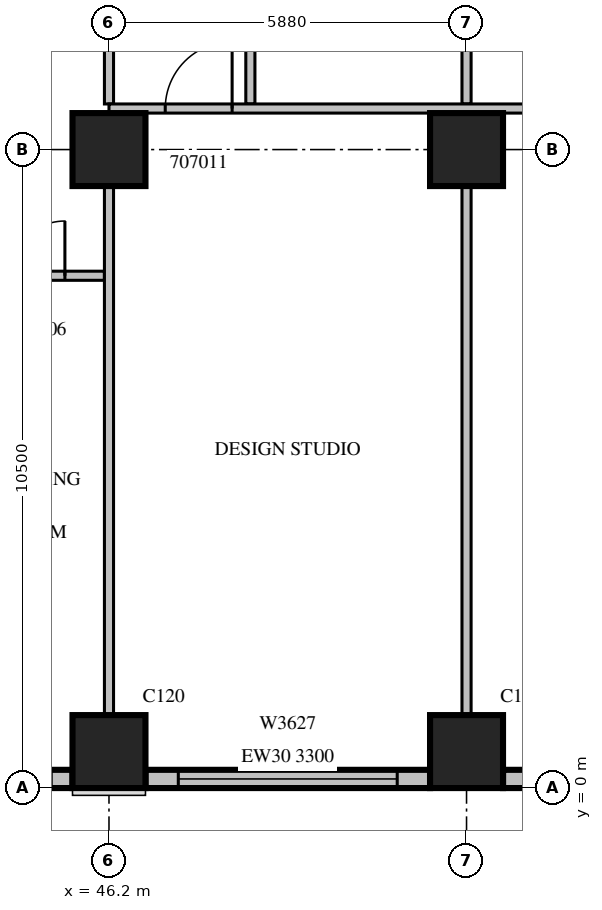
"""IFC4 building model, lengths in metres.
Left out: names, types, materials, properties, quantities, classifications, styles, units other than length and angle.
Written with IfcOpenShell. Run it as: python <this file> out.ifc"""

import sys

from ifc_helpers import new_model, si_unit, direction, frame, frame_2d, origin, origin_2d, place, context, subcontext, project, spatial, rectangle, extrude, source, transform, mapped, element, fill, save


model = new_model("IFC4")
c1 = context("Model", 3, precision=1e-05, world=origin(), true_north=direction((0.0, 1.0)))
c2 = subcontext(c1, "Body", "Model", "MODEL_VIEW")
j1 = project(units=[si_unit("LENGTHUNIT", "METRE"), si_unit("PLANEANGLEUNIT", "RADIAN")], contexts=[c1])
p1 = place(None, origin())
s1 = spatial("IfcSite", under=j1, at=p1, CompositionType="ELEMENT")
p2 = place(p1, origin())
s2 = spatial("IfcBuilding", under=s1, at=p2, CompositionType="ELEMENT")
p3 = place(p2, frame((0.0, 0.0, 40.5)))
s3 = spatial("IfcBuildingStorey", under=s2, at=p3, CompositionType="ELEMENT", Elevation=40.5)
m1 = source(origin(), c2, "Body", "SweptSolid", [
    extrude(rectangle(XDim=1.2, YDim=1.2, at=origin_2d()), origin(), (0.0, 0.0, 1.0), 4.2),
])
for number, where, z_axis, x_axis in (
    (1, (46.2, 0.6, 0.0), (0.0, 0.0, 1.0), (1.0, 0.0, 0.0)),
    (2, (52.08, 0.6, 0.0), (0.0, 0.0, 1.0), (1.0, 0.0, 0.0)),
    (3, (46.2, 10.5, 0.0), (0.0, 0.0, 1.0), (1.0, 0.0, 0.0)),
    (4, (52.08, 10.5, 0.0), (0.0, 0.0, 1.0), (1.0, 0.0, 0.0)),
):
    element("IfcColumn", number, at=place(p3, frame(where, z_axis=z_axis, x_axis=x_axis)), inside=s3, PredefinedType="COLUMN", context=c2, shape_type="MappedRepresentation", body=[
        mapped(m1, transform((0.0, 0.0, 0.0), scale=1.0)),
    ])
p4 = place(p3, frame((44.0, 0.15, 0.0), z_axis=(0.0, 0.0, 1.0), x_axis=(1.0, 0.0, 0.0)))
e5 = element("IfcWall", 5, at=p4, inside=s3, PredefinedType="STANDARD", context=c2, shape_type="SweptSolid", body=[
    extrude(rectangle(XDim=1.6, YDim=0.3, at=frame_2d((0.8, 0.0))), origin(), (0.0, 0.0, 1.0), 3.8),
])
p5 = place(p4, frame((0.35, 0.0, 0.6)))
e6 = element("IfcOpeningElement", 6, at=p5, cuts=e5, PredefinedType="OPENING", context=c2, shape_type="SweptSolid", body=[
    extrude(rectangle(XDim=0.9, YDim=2.7, at=frame_2d((0.45, 1.35))), frame((0.0, 0.16, 0.0), z_axis=(0.0, -1.0, 0.0), x_axis=(1.0, 0.0, 0.0)), (0.0, 0.0, 1.0), 0.32),
])
p6 = place(p3, frame((46.8, 0.15, 0.0), z_axis=(0.0, 0.0, 1.0), x_axis=(1.0, 0.0, 0.0)))
e7 = element("IfcWall", 7, at=p6, inside=s3, PredefinedType="STANDARD", context=c2, shape_type="SweptSolid", body=[
    extrude(rectangle(XDim=4.68, YDim=0.3, at=frame_2d((2.34, 0.0))), origin(), (0.0, 0.0, 1.0), 3.3),
])
m2 = source(origin(), c2, "Body", "SweptSolid", [
    extrude(rectangle(XDim=3.6, YDim=2.7, at=frame_2d((1.8, 1.35))), frame((0.0, 0.16, 0.0), z_axis=(0.0, -1.0, 0.0), x_axis=(1.0, 0.0, 0.0)), (0.0, 0.0, 1.0), 0.32),
])
p7 = place(p6, frame((0.54, 0.0, 0.6)))
e8 = element("IfcOpeningElement", 8, at=p7, cuts=e7, PredefinedType="OPENING", context=c2, shape_type="MappedRepresentation", body=[
    mapped(m2, transform((0.0, 0.0, 0.0), scale=1.0)),
])
p8 = place(p3, frame((52.68, 0.15, 0.0), z_axis=(0.0, 0.0, 1.0), x_axis=(1.0, 0.0, 0.0)))
e9 = element("IfcWall", 9, at=p8, inside=s3, PredefinedType="STANDARD", context=c2, shape_type="SweptSolid", body=[
    extrude(rectangle(XDim=4.68, YDim=0.3, at=frame_2d((2.34, 0.0))), origin(), (0.0, 0.0, 1.0), 3.8),
])
p9 = place(p8, frame((0.54, 0.0, 0.6)))
e10 = element("IfcOpeningElement", 10, at=p9, cuts=e9, PredefinedType="OPENING", context=c2, shape_type="MappedRepresentation", body=[
    mapped(m2, transform((0.0, 0.0, 0.0), scale=1.0)),
])
p10 = place(p3, frame((46.125, 8.425, 0.0), z_axis=(0.0, 0.0, 1.0), x_axis=(-1.0, 0.0, 0.0)))
e11 = element("IfcWall", 11, at=p10, inside=s3, PredefinedType="PARTITIONING", context=c2, shape_type="SweptSolid", body=[
    extrude(rectangle(XDim=2.2, YDim=0.15, at=frame_2d((1.1, 0.0))), origin(), (0.0, 0.0, 1.0), 3.8),
])
m3 = source(origin(), c2, "Body", "SweptSolid", [
    extrude(rectangle(XDim=0.9, YDim=2.1, at=frame_2d((0.45, 1.05))), frame((0.0, 0.085, 0.0), z_axis=(0.0, -1.0, 0.0), x_axis=(1.0, 0.0, 0.0)), (0.0, 0.0, 1.0), 0.17),
])
p11 = place(p10, frame((0.65, 0.0, 0.0)))
e12 = element("IfcOpeningElement", 12, at=p11, cuts=e11, PredefinedType="OPENING", context=c2, shape_type="MappedRepresentation", body=[
    mapped(m3, transform((0.0, 0.0, 0.0), scale=1.0)),
])
m4 = source(origin(), c2, "Body", "SweptSolid", [
    extrude(rectangle(XDim=3.75, YDim=0.15, at=frame_2d((1.875, 0.0))), origin(), (0.0, 0.0, 1.0), 3.8),
])
p12 = place(p3, frame((48.525, 11.25, 0.0), z_axis=(0.0, 0.0, 1.0), x_axis=(0.0, 1.0, 0.0)))
e13 = element("IfcWall", 13, at=p12, inside=s3, PredefinedType="PARTITIONING", context=c2, shape_type="MappedRepresentation", body=[
    mapped(m4, transform((0.0, 0.0, 0.0), scale=1.0)),
])
m5 = source(origin(), c2, "Body", "SweptSolid", [
    extrude(rectangle(XDim=8.702, YDim=0.15, at=frame_2d((4.351, 0.0))), origin(), (0.0, 0.0, 1.0), 3.8),
])
p13 = place(p3, frame((46.2, 1.199, 0.0), z_axis=(0.0, 0.0, 1.0), x_axis=(0.0, 1.0, 0.0)))
e14 = element("IfcWall", 14, at=p13, inside=s3, PredefinedType="PARTITIONING", context=c2, shape_type="MappedRepresentation", body=[
    mapped(m5, transform((0.0, 0.0, 0.0), scale=1.0)),
])
p14 = place(p3, frame((46.2, 11.25, 0.0), z_axis=(0.0, 0.0, 1.0), x_axis=(0.0, 1.0, 0.0)))
e15 = element("IfcWall", 15, at=p14, inside=s3, PredefinedType="PARTITIONING", context=c2, shape_type="MappedRepresentation", body=[
    mapped(m4, transform((0.0, 0.0, 0.0), scale=1.0)),
])
p15 = place(p3, frame((52.08, 1.199, 0.0), z_axis=(0.0, 0.0, 1.0), x_axis=(0.0, 1.0, 0.0)))
e16 = element("IfcWall", 16, at=p15, inside=s3, PredefinedType="PARTITIONING", context=c2, shape_type="MappedRepresentation", body=[
    mapped(m5, transform((0.0, 0.0, 0.0), scale=1.0)),
])
p16 = place(p3, frame((52.08, 11.25, 0.0), z_axis=(0.0, 0.0, 1.0), x_axis=(0.0, 1.0, 0.0)))
e17 = element("IfcWall", 17, at=p16, inside=s3, PredefinedType="PARTITIONING", context=c2, shape_type="MappedRepresentation", body=[
    mapped(m4, transform((0.0, 0.0, 0.0), scale=1.0)),
])
p17 = place(p3, frame((71.1, 11.175, 0.0), z_axis=(0.0, 0.0, 1.0), x_axis=(-1.0, 0.0, 0.0)))
e18 = element("IfcWall", 18, at=p17, inside=s3, PredefinedType="PARTITIONING", context=c2, shape_type="SweptSolid", body=[
    extrude(rectangle(XDim=24.9, YDim=0.15, at=frame_2d((12.45, 0.0))), origin(), (0.0, 0.0, 1.0), 3.8),
])
m6 = source(origin(), c2, "Body", "SweptSolid", [
    extrude(rectangle(XDim=1.1, YDim=2.1, at=frame_2d((0.55, 1.05))), frame((0.0, 0.085, 0.0), z_axis=(0.0, -1.0, 0.0), x_axis=(1.0, 0.0, 0.0)), (0.0, 0.0, 1.0), 0.17),
])
p18 = place(p17, frame((22.875, 0.0, 0.0)))
e19 = element("IfcOpeningElement", 19, at=p18, cuts=e18, PredefinedType="OPENING", context=c2, shape_type="MappedRepresentation", body=[
    mapped(m6, transform((0.0, 0.0, 0.0), scale=1.0)),
])
p19 = place(p17, frame((15.633, 0.0, 0.0)))
e20 = element("IfcOpeningElement", 20, at=p19, cuts=e18, PredefinedType="OPENING", context=c2, shape_type="MappedRepresentation", body=[
    mapped(m3, transform((0.0, 0.0, 0.0), scale=1.0)),
])
p20 = place(p17, frame((9.752, 0.0, 0.0)))
e21 = element("IfcOpeningElement", 21, at=p20, cuts=e18, PredefinedType="OPENING", context=c2, shape_type="MappedRepresentation", body=[
    mapped(m3, transform((0.0, 0.0, 0.0), scale=1.0)),
])
p21 = place(p17, frame((4.607, 0.0, 0.0)))
e22 = element("IfcOpeningElement", 22, at=p21, cuts=e18, PredefinedType="OPENING", context=c2, shape_type="MappedRepresentation", body=[
    mapped(m3, transform((0.0, 0.0, 0.0), scale=1.0)),
])
p22 = place(p17, frame((2.243, 0.0, 0.0)))
e23 = element("IfcOpeningElement", 23, at=p22, cuts=e18, PredefinedType="OPENING", context=c2, shape_type="MappedRepresentation", body=[
    mapped(m3, transform((0.0, 0.0, 0.0), scale=1.0)),
])
m7 = source(origin(), c2, "Body", "SweptSolid", [
    extrude(rectangle(XDim=3.6, YDim=2.7, at=frame_2d((1.8, 1.35))), frame((0.0, 0.03, 0.0), z_axis=(0.0, -1.0, 0.0), x_axis=(1.0, 0.0, 0.0)), (0.0, 0.0, 1.0), 0.06),
])
p23 = place(p7, origin())
e24 = element("IfcWindow", 24, at=p23, inside=s3, PartitioningType="SINGLE_PANEL", PredefinedType="WINDOW", context=c2, shape_type="MappedRepresentation", body=[
    mapped(m7, transform((0.0, 0.0, 0.0), scale=1.0)),
])
fill(e8, e24)
m8 = source(origin(), c2, "Body", "SweptSolid", [
    extrude(rectangle(XDim=0.9, YDim=2.1, at=frame_2d((0.45, 1.05))), frame((0.0, 0.025, 0.0), z_axis=(0.0, -1.0, 0.0), x_axis=(1.0, 0.0, 0.0)), (0.0, 0.0, 1.0), 0.05),
])
p24 = place(p11, origin())
e25 = element("IfcDoor", 25, at=p24, inside=s3, OperationType="SINGLE_SWING_RIGHT", PredefinedType="DOOR", context=c2, shape_type="MappedRepresentation", body=[
    mapped(m8, transform((0.0, 0.0, 0.0), scale=1.0)),
])
fill(e12, e25)
m9 = source(origin(), c2, "Body", "SweptSolid", [
    extrude(rectangle(XDim=1.1, YDim=2.1, at=frame_2d((0.55, 1.05))), frame((0.0, 0.025, 0.0), z_axis=(0.0, -1.0, 0.0), x_axis=(1.0, 0.0, 0.0)), (0.0, 0.0, 1.0), 0.05),
])
p25 = place(p18, origin())
e26 = element("IfcDoor", 26, at=p25, inside=s3, OperationType="SINGLE_SWING_RIGHT", PredefinedType="DOOR", context=c2, shape_type="MappedRepresentation", body=[
    mapped(m9, transform((0.0, 0.0, 0.0), scale=1.0)),
])
fill(e19, e26)
save(model, sys.argv[1])
